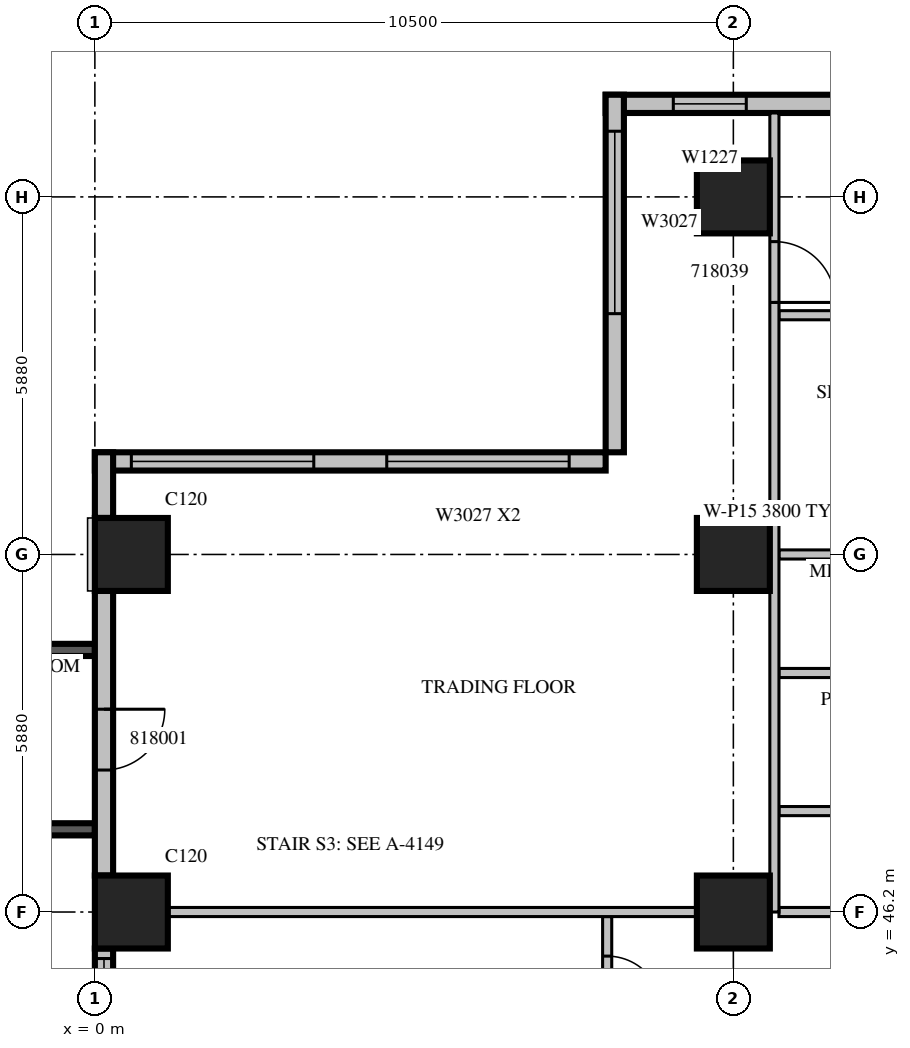
"""IFC4 building model, lengths in metres.
Left out: names, types, materials, properties, quantities, classifications, styles, units other than length and angle.
Written with IfcOpenShell. Run it as: python <this file> out.ifc"""

import sys

from ifc_helpers import new_model, si_unit, direction, frame, frame_2d, origin, origin_2d, place, context, subcontext, project, spatial, rectangle, extrude, source, transform, mapped, element, fill, save


model = new_model("IFC4")
c1 = context("Model", 3, precision=1e-05, world=origin(), true_north=direction((0.0, 1.0)))
c2 = subcontext(c1, "Body", "Model", "MODEL_VIEW")
j1 = project(units=[si_unit("LENGTHUNIT", "METRE"), si_unit("PLANEANGLEUNIT", "RADIAN")], contexts=[c1])
p1 = place(None, origin())
s1 = spatial("IfcSite", under=j1, at=p1, CompositionType="ELEMENT")
p2 = place(p1, origin())
s2 = spatial("IfcBuilding", under=s1, at=p2, CompositionType="ELEMENT")
p3 = place(p2, frame((0.0, 0.0, 86.7)))
s3 = spatial("IfcBuildingStorey", under=s2, at=p3, CompositionType="ELEMENT", Elevation=86.7)
m1 = source(origin(), c2, "Body", "SweptSolid", [
    extrude(rectangle(XDim=1.2, YDim=1.2, at=origin_2d()), origin(), (0.0, 0.0, 1.0), 4.2),
])
for number, where, z_axis, x_axis in (
    (1, (0.6, 46.2, 0.0), (0.0, 0.0, 1.0), (1.0, 0.0, 0.0)),
    (2, (10.5, 46.2, 0.0), (0.0, 0.0, 1.0), (1.0, 0.0, 0.0)),
    (3, (0.6, 52.08, 0.0), (0.0, 0.0, 1.0), (1.0, 0.0, 0.0)),
    (4, (10.5, 52.08, 0.0), (0.0, 0.0, 1.0), (1.0, 0.0, 0.0)),
    (5, (10.5, 57.96, 0.0), (0.0, 0.0, 1.0), (1.0, 0.0, 0.0)),
):
    element("IfcColumn", number, at=place(p3, frame(where, z_axis=z_axis, x_axis=x_axis)), inside=s3, PredefinedType="COLUMN", context=c2, shape_type="MappedRepresentation", body=[
        mapped(m1, transform((0.0, 0.0, 0.0), scale=1.0)),
    ])
m2 = source(origin(), c2, "Body", "SweptSolid", [
    extrude(rectangle(XDim=3.9, YDim=0.2, at=frame_2d((1.95, 0.0))), origin(), (0.0, 0.0, 1.0), 3.8),
])
p4 = place(p3, frame((0.0, 50.51, 0.0), z_axis=(0.0, 0.0, 1.0), x_axis=(-1.0, 0.0, 0.0)))
e6 = element("IfcWall", 6, at=p4, inside=s3, PredefinedType="SOLIDWALL", context=c2, shape_type="MappedRepresentation", body=[
    mapped(m2, transform((0.0, 0.0, 0.0), scale=1.0)),
])
m3 = source(origin(), c2, "Body", "SweptSolid", [
    extrude(rectangle(XDim=2.4, YDim=2.7, at=frame_2d((1.2, 1.35))), frame((0.0, 0.11, 0.0), z_axis=(0.0, -1.0, 0.0), x_axis=(1.0, 0.0, 0.0)), (0.0, 0.0, 1.0), 0.22),
])
p5 = place(p4, frame((0.75, 0.0, 0.6)))
e7 = element("IfcOpeningElement", 7, at=p5, cuts=e6, PredefinedType="OPENING", context=c2, shape_type="MappedRepresentation", body=[
    mapped(m3, transform((0.0, 0.0, 0.0), scale=1.0)),
])
p6 = place(p3, frame((0.0, 47.56, 0.0), z_axis=(0.0, 0.0, 1.0), x_axis=(-1.0, 0.0, 0.0)))
e8 = element("IfcWall", 8, at=p6, inside=s3, PredefinedType="SOLIDWALL", context=c2, shape_type="MappedRepresentation", body=[
    mapped(m2, transform((0.0, 0.0, 0.0), scale=1.0)),
])
p7 = place(p6, frame((0.75, 0.0, 0.6)))
e9 = element("IfcOpeningElement", 9, at=p7, cuts=e8, PredefinedType="OPENING", context=c2, shape_type="MappedRepresentation", body=[
    mapped(m3, transform((0.0, 0.0, 0.0), scale=1.0)),
])
m4 = source(origin(), c2, "Body", "SweptSolid", [
    extrude(rectangle(XDim=8.2, YDim=0.3, at=frame_2d((4.1, 0.0))), origin(), (0.0, 0.0, 1.0), 3.8),
])
p8 = place(p3, frame((16.6, 59.49, 0.0), z_axis=(0.0, 0.0, 1.0), x_axis=(-1.0, 0.0, 0.0)))
e10 = element("IfcWall", 10, at=p8, inside=s3, PredefinedType="STANDARD", context=c2, shape_type="MappedRepresentation", body=[
    mapped(m4, transform((0.0, 0.0, 0.0), scale=1.0)),
])
m5 = source(origin(), c2, "Body", "SweptSolid", [
    extrude(rectangle(XDim=1.2, YDim=2.7, at=frame_2d((0.6, 1.35))), frame((0.0, 0.16, 0.0), z_axis=(0.0, -1.0, 0.0), x_axis=(1.0, 0.0, 0.0)), (0.0, 0.0, 1.0), 0.32),
])
p9 = place(p8, frame((5.888, 0.0, 0.6)))
e11 = element("IfcOpeningElement", 11, at=p9, cuts=e10, PredefinedType="OPENING", context=c2, shape_type="MappedRepresentation", body=[
    mapped(m5, transform((0.0, 0.0, 0.0), scale=1.0)),
])
m6 = source(origin(), c2, "Body", "SweptSolid", [
    extrude(rectangle(XDim=1.8, YDim=2.7, at=frame_2d((0.9, 1.35))), frame((0.0, 0.16, 0.0), z_axis=(0.0, -1.0, 0.0), x_axis=(1.0, 0.0, 0.0)), (0.0, 0.0, 1.0), 0.32),
])
p10 = place(p8, frame((2.172, 0.0, 0.6)))
e12 = element("IfcOpeningElement", 12, at=p10, cuts=e10, PredefinedType="OPENING", context=c2, shape_type="MappedRepresentation", body=[
    mapped(m6, transform((0.0, 0.0, 0.0), scale=1.0)),
])
m7 = source(origin(), c2, "Body", "SweptSolid", [
    extrude(rectangle(XDim=5.88, YDim=0.3, at=frame_2d((2.94, 0.0))), origin(), (0.0, 0.0, 1.0), 3.8),
])
p11 = place(p3, frame((8.55, 59.64, 0.0), z_axis=(0.0, 0.0, 1.0), x_axis=(0.0, -1.0, 0.0)))
e13 = element("IfcWall", 13, at=p11, inside=s3, PredefinedType="STANDARD", context=c2, shape_type="MappedRepresentation", body=[
    mapped(m7, transform((0.0, 0.0, 0.0), scale=1.0)),
])
m8 = source(origin(), c2, "Body", "SweptSolid", [
    extrude(rectangle(XDim=3.0, YDim=2.7, at=frame_2d((1.5, 1.35))), frame((0.0, 0.16, 0.0), z_axis=(0.0, -1.0, 0.0), x_axis=(1.0, 0.0, 0.0)), (0.0, 0.0, 1.0), 0.32),
])
p12 = place(p11, frame((0.6, 0.0, 0.6)))
e14 = element("IfcOpeningElement", 14, at=p12, cuts=e13, PredefinedType="OPENING", context=c2, shape_type="MappedRepresentation", body=[
    mapped(m8, transform((0.0, 0.0, 0.0), scale=1.0)),
])
m9 = source(origin(), c2, "Body", "SweptSolid", [
    extrude(rectangle(XDim=8.4, YDim=0.3, at=frame_2d((4.2, 0.0))), origin(), (0.0, 0.0, 1.0), 3.8),
])
p13 = place(p3, frame((8.4, 53.61, 0.0), z_axis=(0.0, 0.0, 1.0), x_axis=(-1.0, 0.0, 0.0)))
e15 = element("IfcWall", 15, at=p13, inside=s3, PredefinedType="STANDARD", context=c2, shape_type="MappedRepresentation", body=[
    mapped(m9, transform((0.0, 0.0, 0.0), scale=1.0)),
])
p14 = place(p13, frame((0.6, 0.0, 0.6)))
e16 = element("IfcOpeningElement", 16, at=p14, cuts=e15, PredefinedType="OPENING", context=c2, shape_type="MappedRepresentation", body=[
    mapped(m8, transform((0.0, 0.0, 0.0), scale=1.0)),
])
p15 = place(p13, frame((4.8, 0.0, 0.6)))
e17 = element("IfcOpeningElement", 17, at=p15, cuts=e15, PredefinedType="OPENING", context=c2, shape_type="MappedRepresentation", body=[
    mapped(m8, transform((0.0, 0.0, 0.0), scale=1.0)),
])
m10 = source(origin(), c2, "Body", "SweptSolid", [
    extrude(rectangle(XDim=1.08, YDim=0.3, at=frame_2d((0.54, 0.0))), origin(), (0.0, 0.0, 1.0), 3.8),
])
p16 = place(p3, frame((0.15, 53.76, 0.0), z_axis=(0.0, 0.0, 1.0), x_axis=(0.0, -1.0, 0.0)))
e18 = element("IfcWall", 18, at=p16, inside=s3, PredefinedType="STANDARD", context=c2, shape_type="MappedRepresentation", body=[
    mapped(m10, transform((0.0, 0.0, 0.0), scale=1.0)),
])
m11 = source(origin(), c2, "Body", "SweptSolid", [
    extrude(rectangle(XDim=4.68, YDim=0.3, at=frame_2d((2.34, 0.0))), origin(), (0.0, 0.0, 1.0), 3.8),
])
p17 = place(p3, frame((0.15, 51.48, 0.0), z_axis=(0.0, 0.0, 1.0), x_axis=(0.0, -1.0, 0.0)))
e19 = element("IfcWall", 19, at=p17, inside=s3, PredefinedType="STANDARD", context=c2, shape_type="MappedRepresentation", body=[
    mapped(m11, transform((0.0, 0.0, 0.0), scale=1.0)),
])
m12 = source(origin(), c2, "Body", "SweptSolid", [
    extrude(rectangle(XDim=1.0, YDim=2.1, at=frame_2d((0.5, 1.05))), frame((0.0, 0.16, 0.0), z_axis=(0.0, -1.0, 0.0), x_axis=(1.0, 0.0, 0.0)), (0.0, 0.0, 1.0), 0.32),
])
p18 = place(p17, frame((1.945, 0.0, 0.0)))
e20 = element("IfcOpeningElement", 20, at=p18, cuts=e19, PredefinedType="OPENING", context=c2, shape_type="MappedRepresentation", body=[
    mapped(m12, transform((0.0, 0.0, 0.0), scale=1.0)),
])
m13 = source(origin(), c2, "Body", "SweptSolid", [
    extrude(rectangle(XDim=1.6, YDim=0.3, at=frame_2d((0.8, 0.0))), origin(), (0.0, 0.0, 1.0), 3.8),
])
p19 = place(p3, frame((0.15, 45.6, 0.0), z_axis=(0.0, 0.0, 1.0), x_axis=(0.0, -1.0, 0.0)))
e21 = element("IfcWall", 21, at=p19, inside=s3, PredefinedType="STANDARD", context=c2, shape_type="MappedRepresentation", body=[
    mapped(m13, transform((0.0, 0.0, 0.0), scale=1.0)),
])
p20 = place(p19, frame((0.165, 0.0, 0.6)))
e22 = element("IfcOpeningElement", 22, at=p20, cuts=e21, PredefinedType="OPENING", context=c2, shape_type="MappedRepresentation", body=[
    mapped(m5, transform((0.0, 0.0, 0.0), scale=1.0)),
])
m14 = source(origin(), c2, "Body", "SweptSolid", [
    extrude(rectangle(XDim=2.2, YDim=0.15, at=frame_2d((1.1, 0.0))), origin(), (0.0, 0.0, 1.0), 3.8),
])
p21 = place(p3, frame((8.425, 43.925, 0.0), z_axis=(0.0, 0.0, 1.0), x_axis=(0.0, 1.0, 0.0)))
e23 = element("IfcWall", 23, at=p21, inside=s3, PredefinedType="PARTITIONING", context=c2, shape_type="MappedRepresentation", body=[
    mapped(m14, transform((0.0, 0.0, 0.0), scale=1.0)),
])
m15 = source(origin(), c2, "Body", "SweptSolid", [
    extrude(rectangle(XDim=0.9, YDim=2.1, at=frame_2d((0.45, 1.05))), frame((0.0, 0.085, 0.0), z_axis=(0.0, -1.0, 0.0), x_axis=(1.0, 0.0, 0.0)), (0.0, 0.0, 1.0), 0.17),
])
p22 = place(p21, frame((0.65, 0.0, 0.0)))
e24 = element("IfcOpeningElement", 24, at=p22, cuts=e23, PredefinedType="OPENING", context=c2, shape_type="MappedRepresentation", body=[
    mapped(m15, transform((0.0, 0.0, 0.0), scale=1.0)),
])
m16 = source(origin(), c2, "Body", "SweptSolid", [
    extrude(rectangle(XDim=3.45, YDim=0.15, at=frame_2d((1.725, 0.0))), origin(), (0.0, 0.0, 1.0), 3.8),
])
for number, where, z_axis, x_axis in (
    (25, (14.7, 47.86, 0.0), (0.0, 0.0, 1.0), (-1.0, 0.0, 0.0)),
    (26, (14.7, 50.131, 0.0), (0.0, 0.0, 1.0), (-1.0, 0.0, 0.0)),
    (27, (14.7, 52.08, 0.0), (0.0, 0.0, 1.0), (-1.0, 0.0, 0.0)),
    (28, (14.7, 56.014, 0.0), (0.0, 0.0, 1.0), (-1.0, 0.0, 0.0)),
):
    element("IfcWall", number, at=place(p3, frame(where, z_axis=z_axis, x_axis=x_axis)), inside=s3, PredefinedType="PARTITIONING", context=c2, shape_type="MappedRepresentation", body=[
        mapped(m16, transform((0.0, 0.0, 0.0), scale=1.0)),
    ])
m17 = source(origin(), c2, "Body", "SweptSolid", [
    extrude(rectangle(XDim=8.702, YDim=0.15, at=frame_2d((4.351, 0.0))), origin(), (0.0, 0.0, 1.0), 3.8),
])
p23 = place(p3, frame((9.901, 46.2, 0.0), z_axis=(0.0, 0.0, 1.0), x_axis=(-1.0, 0.0, 0.0)))
e29 = element("IfcWall", 29, at=p23, inside=s3, PredefinedType="PARTITIONING", context=c2, shape_type="MappedRepresentation", body=[
    mapped(m17, transform((0.0, 0.0, 0.0), scale=1.0)),
])
p24 = place(p3, frame((14.7, 46.2, 0.0), z_axis=(0.0, 0.0, 1.0), x_axis=(-1.0, 0.0, 0.0)))
e30 = element("IfcWall", 30, at=p24, inside=s3, PredefinedType="PARTITIONING", context=c2, shape_type="MappedRepresentation", body=[
    mapped(m16, transform((0.0, 0.0, 0.0), scale=1.0)),
])
p25 = place(p3, frame((11.175, 46.2, 0.0), z_axis=(0.0, 0.0, 1.0), x_axis=(0.0, 1.0, 0.0)))
e31 = element("IfcWall", 31, at=p25, inside=s3, PredefinedType="PARTITIONING", context=c2, shape_type="SweptSolid", body=[
    extrude(rectangle(XDim=13.14, YDim=0.15, at=frame_2d((6.57, 0.0))), origin(), (0.0, 0.0, 1.0), 3.8),
])
m18 = source(origin(), c2, "Body", "SweptSolid", [
    extrude(rectangle(XDim=1.0, YDim=2.1, at=frame_2d((0.5, 1.05))), frame((0.0, 0.085, 0.0), z_axis=(0.0, -1.0, 0.0), x_axis=(1.0, 0.0, 0.0)), (0.0, 0.0, 1.0), 0.17),
])
p26 = place(p25, frame((10.024, 0.0, 0.0)))
e32 = element("IfcOpeningElement", 32, at=p26, cuts=e31, PredefinedType="OPENING", context=c2, shape_type="MappedRepresentation", body=[
    mapped(m18, transform((0.0, 0.0, 0.0), scale=1.0)),
])
m19 = source(origin(), c2, "Body", "SweptSolid", [
    extrude(rectangle(XDim=1.2, YDim=2.7, at=frame_2d((0.6, 1.35))), frame((0.0, 0.03, 0.0), z_axis=(0.0, -1.0, 0.0), x_axis=(1.0, 0.0, 0.0)), (0.0, 0.0, 1.0), 0.06),
])
p27 = place(p9, origin())
e33 = element("IfcWindow", 33, at=p27, inside=s3, PartitioningType="SINGLE_PANEL", PredefinedType="WINDOW", context=c2, shape_type="MappedRepresentation", body=[
    mapped(m19, transform((0.0, 0.0, 0.0), scale=1.0)),
])
fill(e11, e33)
m20 = source(origin(), c2, "Body", "SweptSolid", [
    extrude(rectangle(XDim=3.0, YDim=2.7, at=frame_2d((1.5, 1.35))), frame((0.0, 0.03, 0.0), z_axis=(0.0, -1.0, 0.0), x_axis=(1.0, 0.0, 0.0)), (0.0, 0.0, 1.0), 0.06),
])
p28 = place(p12, origin())
e34 = element("IfcWindow", 34, at=p28, inside=s3, PartitioningType="SINGLE_PANEL", PredefinedType="WINDOW", context=c2, shape_type="MappedRepresentation", body=[
    mapped(m20, transform((0.0, 0.0, 0.0), scale=1.0)),
])
fill(e14, e34)
p29 = place(p14, origin())
e35 = element("IfcWindow", 35, at=p29, inside=s3, PartitioningType="SINGLE_PANEL", PredefinedType="WINDOW", context=c2, shape_type="MappedRepresentation", body=[
    mapped(m20, transform((0.0, 0.0, 0.0), scale=1.0)),
])
fill(e16, e35)
p30 = place(p15, origin())
e36 = element("IfcWindow", 36, at=p30, inside=s3, PartitioningType="SINGLE_PANEL", PredefinedType="WINDOW", context=c2, shape_type="MappedRepresentation", body=[
    mapped(m20, transform((0.0, 0.0, 0.0), scale=1.0)),
])
fill(e17, e36)
p31 = place(p20, origin())
e37 = element("IfcWindow", 37, at=p31, inside=s3, PartitioningType="SINGLE_PANEL", PredefinedType="WINDOW", context=c2, shape_type="MappedRepresentation", body=[
    mapped(m19, transform((0.0, 0.0, 0.0), scale=1.0)),
])
fill(e22, e37)
m21 = source(origin(), c2, "Body", "SweptSolid", [
    extrude(rectangle(XDim=0.9, YDim=2.1, at=frame_2d((0.45, 1.05))), frame((0.0, 0.025, 0.0), z_axis=(0.0, -1.0, 0.0), x_axis=(1.0, 0.0, 0.0)), (0.0, 0.0, 1.0), 0.05),
])
p32 = place(p22, origin())
e38 = element("IfcDoor", 38, at=p32, inside=s3, OperationType="SINGLE_SWING_RIGHT", PredefinedType="DOOR", context=c2, shape_type="MappedRepresentation", body=[
    mapped(m21, transform((0.0, 0.0, 0.0), scale=1.0)),
])
fill(e24, e38)
m22 = source(origin(), c2, "Body", "SweptSolid", [
    extrude(rectangle(XDim=1.0, YDim=2.1, at=frame_2d((0.5, 1.05))), frame((0.0, 0.025, 0.0), z_axis=(0.0, -1.0, 0.0), x_axis=(1.0, 0.0, 0.0)), (0.0, 0.0, 1.0), 0.05),
])
p33 = place(p26, origin())
e39 = element("IfcDoor", 39, at=p33, inside=s3, OperationType="SINGLE_SWING_RIGHT", PredefinedType="DOOR", context=c2, shape_type="MappedRepresentation", body=[
    mapped(m22, transform((0.0, 0.0, 0.0), scale=1.0)),
])
fill(e32, e39)
p34 = place(p18, origin())
e40 = element("IfcDoor", 40, at=p34, inside=s3, OperationType="SINGLE_SWING_LEFT", PredefinedType="DOOR", context=c2, shape_type="MappedRepresentation", body=[
    mapped(m22, transform((0.0, 0.0, 0.0), scale=1.0)),
])
fill(e20, e40)
save(model, sys.argv[1])
